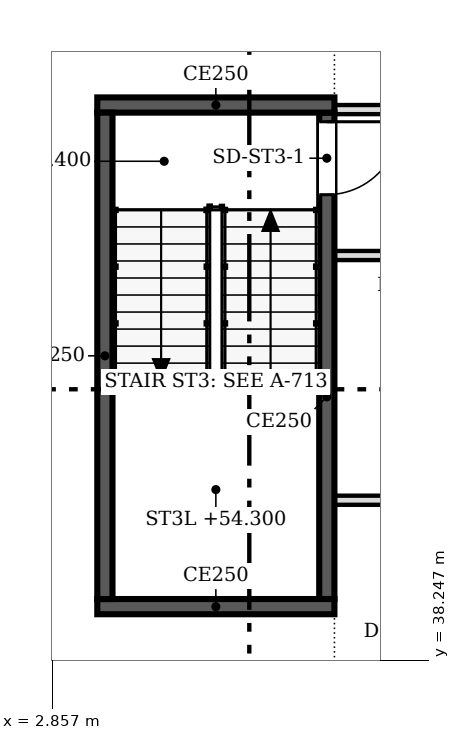
"""IFC4 building model, lengths in metres.
Left out: names, types, materials, properties, quantities, classifications, styles, units other than length and angle.
Written with IfcOpenShell. Run it as: python <this file> out.ifc"""

import sys

from ifc_helpers import new_model, si_unit, direction, frame, frame_2d, origin, place, context, subcontext, project, spatial, rectangle, extrude, source, transform, mapped, element, fill, save


model = new_model("IFC4")
c1 = context("Model", 3, precision=1e-05, world=origin(), true_north=direction((0.0, 1.0)))
c2 = subcontext(c1, "Body", "Model", "MODEL_VIEW")
j1 = project(units=[si_unit("LENGTHUNIT", "METRE"), si_unit("PLANEANGLEUNIT", "RADIAN")], contexts=[c1])
p1 = place(None, origin())
s1 = spatial("IfcSite", under=j1, at=p1, CompositionType="ELEMENT")
p2 = place(p1, origin())
s2 = spatial("IfcBuilding", under=s1, at=p2, CompositionType="ELEMENT")
p3 = place(p2, frame((0.0, 0.0, 52.4)))
s3 = spatial("IfcBuildingStorey", under=s2, at=p3, CompositionType="ELEMENT", Elevation=52.4)
p4 = place(p3, frame((7.5, 39.125, 0.0), z_axis=(0.0, 0.0, 1.0), x_axis=(-1.0, 0.0, 0.0)))
e1 = element("IfcWall", 1, at=p4, inside=s3, PredefinedType="SOLIDWALL", context=c2, shape_type="SweptSolid", body=[
    extrude(rectangle(XDim=3.9, YDim=0.25, at=frame_2d((1.95, 0.0))), origin(), (0.0, 0.0, 1.0), 3.8),
])
p5 = place(p3, frame((3.725, 39.25, 0.0), z_axis=(0.0, 0.0, 1.0), x_axis=(0.0, 1.0, 0.0)))
e2 = element("IfcWall", 2, at=p5, inside=s3, PredefinedType="SOLIDWALL", context=c2, shape_type="SweptSolid", body=[
    extrude(rectangle(XDim=8.0, YDim=0.25, at=frame_2d((4.0, 0.0))), origin(), (0.0, 0.0, 1.0), 3.8),
])
p6 = place(p3, frame((3.6, 47.375, 0.0), z_axis=(0.0, 0.0, 1.0), x_axis=(1.0, 0.0, 0.0)))
e3 = element("IfcWall", 3, at=p6, inside=s3, PredefinedType="SOLIDWALL", context=c2, shape_type="SweptSolid", body=[
    extrude(rectangle(XDim=3.9, YDim=0.25, at=frame_2d((1.95, 0.0))), origin(), (0.0, 0.0, 1.0), 3.8),
])
p7 = place(p3, frame((7.375, 47.25, 0.0), z_axis=(0.0, 0.0, 1.0), x_axis=(0.0, -1.0, 0.0)))
e4 = element("IfcWall", 4, at=p7, inside=s3, PredefinedType="SOLIDWALL", context=c2, shape_type="SweptSolid", body=[
    extrude(rectangle(XDim=8.0, YDim=0.25, at=frame_2d((4.0, 0.0))), origin(), (0.0, 0.0, 1.0), 3.8),
])
m1 = source(origin(), c2, "Body", "SweptSolid", [
    extrude(rectangle(XDim=1.2, YDim=2.1, at=frame_2d((0.6, 1.05))), frame((0.0, 0.135, 0.0), z_axis=(0.0, -1.0, 0.0), x_axis=(1.0, 0.0, 0.0)), (0.0, 0.0, 1.0), 0.27),
])
p8 = place(p7, frame((0.15, 0.0, 0.0)))
e5 = element("IfcOpeningElement", 5, at=p8, cuts=e4, PredefinedType="OPENING", context=c2, shape_type="MappedRepresentation", body=[
    mapped(m1, transform((0.0, 0.0, 0.0), scale=1.0)),
])
p9 = place(p3, frame((12.2, 40.875, 0.0), z_axis=(0.0, 0.0, 1.0), x_axis=(-1.0, 0.0, 0.0)))
e6 = element("IfcWall", 6, at=p9, inside=s3, PredefinedType="PARTITIONING", context=c2, shape_type="SweptSolid", body=[
    extrude(rectangle(XDim=4.7, YDim=0.15, at=frame_2d((2.35, 0.0))), origin(), (0.0, 0.0, 1.0), 3.067),
])
m2 = source(origin(), c2, "Body", "SweptSolid", [
    extrude(rectangle(XDim=0.9, YDim=2.1, at=frame_2d((0.45, 1.05))), frame((0.0, 0.085, 0.0), z_axis=(0.0, -1.0, 0.0), x_axis=(1.0, 0.0, 0.0)), (0.0, 0.0, 1.0), 0.17),
])
p10 = place(p9, frame((1.9, 0.0, 0.0)))
e7 = element("IfcOpeningElement", 7, at=p10, cuts=e6, PredefinedType="OPENING", context=c2, shape_type="MappedRepresentation", body=[
    mapped(m2, transform((0.0, 0.0, 0.0), scale=1.0)),
])
p11 = place(p3, frame((28.024, 44.9, 0.0), z_axis=(0.0, 0.0, 1.0), x_axis=(-1.0, 0.0, 0.0)))
e8 = element("IfcWall", 8, at=p11, inside=s3, PredefinedType="PARTITIONING", context=c2, shape_type="SweptSolid", body=[
    extrude(rectangle(XDim=20.524, YDim=0.15, at=frame_2d((10.262, 0.0))), origin(), (0.0, 0.0, 1.0), 3.067),
])
m3 = source(origin(), c2, "Body", "SweptSolid", [
    extrude(rectangle(XDim=1.0, YDim=2.1, at=frame_2d((0.5, 1.05))), frame((0.0, 0.085, 0.0), z_axis=(0.0, -1.0, 0.0), x_axis=(1.0, 0.0, 0.0)), (0.0, 0.0, 1.0), 0.17),
])
p12 = place(p11, frame((17.724, 0.0, 0.0)))
e9 = element("IfcOpeningElement", 9, at=p12, cuts=e8, PredefinedType="OPENING", context=c2, shape_type="MappedRepresentation", body=[
    mapped(m3, transform((0.0, 0.0, 0.0), scale=1.0)),
])
p13 = place(p3, frame((7.5, 47.3, 0.0), z_axis=(0.0, 0.0, 1.0), x_axis=(1.0, 0.0, 0.0)))
e10 = element("IfcWall", 10, at=p13, inside=s3, PredefinedType="PARTITIONING", context=c2, shape_type="SweptSolid", body=[
    extrude(rectangle(XDim=20.6, YDim=0.15, at=frame_2d((10.3, 0.0))), origin(), (0.0, 0.0, 1.0), 3.067),
])
p14 = place(p13, frame((15.301, 0.0, 0.0)))
e11 = element("IfcOpeningElement", 11, at=p14, cuts=e10, PredefinedType="OPENING", context=c2, shape_type="MappedRepresentation", body=[
    mapped(m3, transform((0.0, 0.0, 0.0), scale=1.0)),
])
p15 = place(p13, frame((5.6, 0.0, 0.0)))
e12 = element("IfcOpeningElement", 12, at=p15, cuts=e10, PredefinedType="OPENING", context=c2, shape_type="MappedRepresentation", body=[
    mapped(m3, transform((0.0, 0.0, 0.0), scale=1.0)),
])
m4 = source(origin(), c2, "Body", "SweptSolid", [
    extrude(rectangle(XDim=1.2, YDim=2.1, at=frame_2d((0.6, 1.05))), frame((0.0, 0.025, 0.0), z_axis=(0.0, -1.0, 0.0), x_axis=(1.0, 0.0, 0.0)), (0.0, 0.0, 1.0), 0.05),
])
p16 = place(p8, origin())
e13 = element("IfcDoor", 13, at=p16, inside=s3, OperationType="SINGLE_SWING_LEFT", PredefinedType="DOOR", context=c2, shape_type="MappedRepresentation", body=[
    mapped(m4, transform((0.0, 0.0, 0.0), scale=1.0)),
])
fill(e5, e13)
save(model, sys.argv[1])
